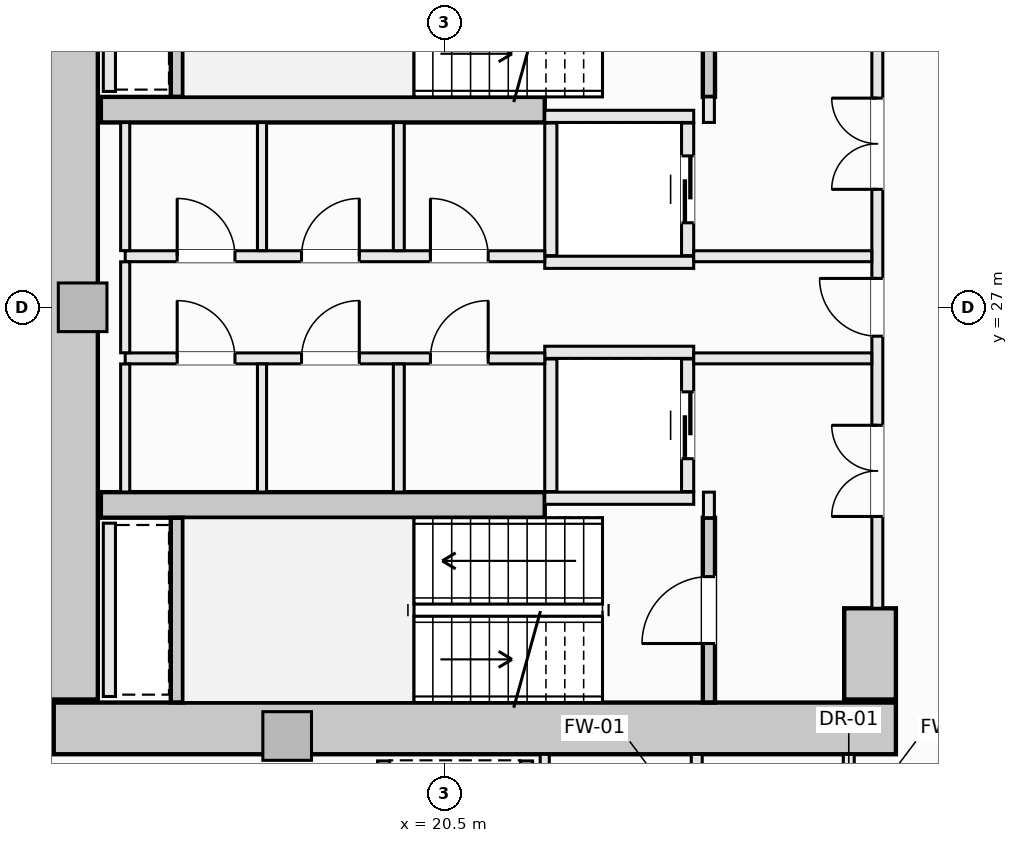
"""IFC4 building model, lengths in metres.
Left out: names, types, materials, properties, quantities, classifications, styles, units other than length and angle.
Written with IfcOpenShell. Run it as: python <this file> out.ifc"""

import sys

from ifc_helpers import new_model, si_unit, direction, frame, frame_2d, origin, origin_2d, place, context, subcontext, project, spatial, rectangle, extrude, element, fill, save


model = new_model("IFC4")
c1 = context("Model", 3, precision=1e-05, world=origin(), true_north=direction((0.0, 1.0)))
c2 = subcontext(c1, "Body", "Model", "MODEL_VIEW")
j1 = project(units=[si_unit("LENGTHUNIT", "METRE"), si_unit("PLANEANGLEUNIT", "RADIAN")], contexts=[c1])
p1 = place(None, origin())
s1 = spatial("IfcSite", under=j1, at=p1, CompositionType="ELEMENT")
p2 = place(p1, origin())
s2 = spatial("IfcBuilding", under=s1, at=p2, CompositionType="ELEMENT")
p3 = place(p2, frame((0.0, 0.0, 34.2)))
s3 = spatial("IfcBuildingStorey", under=s2, at=p3, CompositionType="ELEMENT", Elevation=34.2)
p4 = place(p3, frame((14.075, 20.075, -0.28), z_axis=(0.0, 0.0, 1.0), x_axis=(1.0, 0.0, 0.0)))
e1 = element("IfcWall", 1, at=p4, inside=s3, PredefinedType="SHEAR", context=c2, shape_type="SweptSolid", body=[
    extrude(rectangle(XDim=13.85, YDim=0.85, at=frame_2d((6.925, 0.0))), origin(), (0.0, 0.0, 1.0), 3.85),
])
p5 = place(p3, frame((14.375, 20.55, -0.28), z_axis=(0.0, 0.0, 1.0), x_axis=(0.0, 1.0, 0.0)))
e2 = element("IfcWall", 2, at=p5, inside=s3, PredefinedType="SHEAR", context=c2, shape_type="SweptSolid", body=[
    extrude(rectangle(XDim=12.9, YDim=0.85, at=frame_2d((6.45, 0.0))), origin(), (0.0, 0.0, 1.0), 3.85),
])
p6 = place(p3, frame((27.5, 20.55, -0.28), z_axis=(0.0, 0.0, 1.0), x_axis=(0.0, 1.0, 0.0)))
e3 = element("IfcWall", 3, at=p6, inside=s3, PredefinedType="SHEAR", context=c2, shape_type="SweptSolid", body=[
    extrude(rectangle(XDim=1.5, YDim=0.85, at=frame_2d((0.75, 0.0))), origin(), (0.0, 0.0, 1.0), 3.85),
])
for number, where, z_axis, x_axis in (
    (4, (14.85, 30.25, -0.28), (0.0, 0.0, 1.0), (1.0, 0.0, 0.0)),
    (5, (14.85, 23.75, -0.28), (0.0, 0.0, 1.0), (1.0, 0.0, 0.0)),
):
    element("IfcWall", number, at=place(p3, frame(where, z_axis=z_axis, x_axis=x_axis)), inside=s3, PredefinedType="SHEAR", context=c2, shape_type="SweptSolid", body=[
        extrude(rectangle(XDim=7.3, YDim=0.42, at=frame_2d((3.65, 0.0))), origin(), (0.0, 0.0, 1.0), 3.85),
    ])
for number, where, z_axis, x_axis in (
    (6, (14.55, 27.0, -0.28), (0.0, 0.0, 1.0), (1.0, 0.0, 0.0)),
    (7, (17.914, 19.95, -0.28), (0.0, 0.0, 1.0), (1.0, 0.0, 0.0)),
):
    element("IfcColumn", number, at=place(p3, frame(where, z_axis=z_axis, x_axis=x_axis)), inside=s3, PredefinedType="PILASTER", context=c2, shape_type="SweptSolid", body=[
        extrude(rectangle(XDim=0.8, YDim=0.8, at=origin_2d()), origin(), (0.0, 0.0, 1.0), 3.85),
    ])
p7 = place(p3, frame((24.85, 30.46, -0.28), z_axis=(0.0, 0.0, 1.0), x_axis=(0.0, 1.0, 0.0)))
e8 = element("IfcWall", 8, at=p7, inside=s3, PredefinedType="SHEAR", context=c2, shape_type="SweptSolid", body=[
    extrude(rectangle(XDim=3.038, YDim=0.2, at=frame_2d((1.519, 0.0))), origin(), (0.0, 0.0, 1.0), 3.85),
])
p8 = place(p7, frame((0.969, 0.0, 0.28)))
e9 = element("IfcOpeningElement", 9, at=p8, cuts=e8, PredefinedType="OPENING", context=c2, shape_type="SweptSolid", body=[
    extrude(rectangle(XDim=1.1, YDim=2.15, at=frame_2d((0.55, 1.075))), frame((0.0, 0.11, 0.0), z_axis=(0.0, -1.0, 0.0), x_axis=(1.0, 0.0, 0.0)), (0.0, 0.0, 1.0), 0.22),
])
p9 = place(p3, frame((16.1, 30.462, -0.28), z_axis=(0.0, 0.0, 1.0), x_axis=(0.0, 1.0, 0.0)))
e10 = element("IfcWall", 10, at=p9, inside=s3, PredefinedType="SHEAR", context=c2, shape_type="SweptSolid", body=[
    extrude(rectangle(XDim=3.036, YDim=0.2, at=frame_2d((1.518, 0.0))), origin(), (0.0, 0.0, 1.0), 3.85),
])
p10 = place(p3, frame((24.85, 20.502, -0.28), z_axis=(0.0, 0.0, 1.0), x_axis=(0.0, 1.0, 0.0)))
e11 = element("IfcWall", 11, at=p10, inside=s3, PredefinedType="SHEAR", context=c2, shape_type="SweptSolid", body=[
    extrude(rectangle(XDim=3.038, YDim=0.2, at=frame_2d((1.519, 0.0))), origin(), (0.0, 0.0, 1.0), 3.85),
])
p11 = place(p10, frame((0.969, 0.0, 0.28)))
e12 = element("IfcOpeningElement", 12, at=p11, cuts=e11, PredefinedType="OPENING", context=c2, shape_type="SweptSolid", body=[
    extrude(rectangle(XDim=1.1, YDim=2.15, at=frame_2d((0.55, 1.075))), frame((0.0, 0.11, 0.0), z_axis=(0.0, -1.0, 0.0), x_axis=(1.0, 0.0, 0.0)), (0.0, 0.0, 1.0), 0.22),
])
p12 = place(p3, frame((16.1, 20.502, -0.28), z_axis=(0.0, 0.0, 1.0), x_axis=(0.0, 1.0, 0.0)))
e13 = element("IfcWall", 13, at=p12, inside=s3, PredefinedType="SHEAR", context=c2, shape_type="SweptSolid", body=[
    extrude(rectangle(XDim=3.036, YDim=0.2, at=frame_2d((1.518, 0.0))), origin(), (0.0, 0.0, 1.0), 3.85),
])
for number, where, z_axis, x_axis in (
    (14, (22.15, 30.14, 0.0), (0.0, 0.0, 1.0), (1.0, 0.0, 0.0)),
    (15, (22.15, 27.74, 0.0), (0.0, 0.0, 1.0), (1.0, 0.0, 0.0)),
):
    element("IfcWall", number, at=place(p3, frame(where, z_axis=z_axis, x_axis=x_axis)), inside=s3, PredefinedType="SOLIDWALL", context=c2, shape_type="SweptSolid", body=[
        extrude(rectangle(XDim=2.45, YDim=0.2, at=frame_2d((1.225, 0.0))), origin(), (0.0, 0.0, 1.0), 3.57),
    ])
p13 = place(p3, frame((22.25, 27.85, 0.0), z_axis=(0.0, 0.0, 1.0), x_axis=(0.0, 1.0, 0.0)))
e16 = element("IfcWall", 16, at=p13, inside=s3, PredefinedType="SOLIDWALL", context=c2, shape_type="SweptSolid", body=[
    extrude(rectangle(XDim=2.18, YDim=0.2, at=frame_2d((1.09, 0.0))), origin(), (0.0, 0.0, 1.0), 3.57),
])
p14 = place(p3, frame((24.5, 27.85, 0.0), z_axis=(0.0, 0.0, 1.0), x_axis=(0.0, 1.0, 0.0)))
e17 = element("IfcWall", 17, at=p14, inside=s3, PredefinedType="SOLIDWALL", context=c2, shape_type="SweptSolid", body=[
    extrude(rectangle(XDim=2.18, YDim=0.2, at=frame_2d((1.09, 0.0))), origin(), (0.0, 0.0, 1.0), 3.57),
])
p15 = place(p14, frame((0.54, 0.0, 0.0)))
e18 = element("IfcOpeningElement", 18, at=p15, cuts=e17, PredefinedType="OPENING", context=c2, shape_type="SweptSolid", body=[
    extrude(rectangle(XDim=1.1, YDim=2.2, at=frame_2d((0.55, 1.1))), frame((0.0, 0.11, 0.0), z_axis=(0.0, -1.0, 0.0), x_axis=(1.0, 0.0, 0.0)), (0.0, 0.0, 1.0), 0.22),
])
for number, where, z_axis, x_axis in (
    (19, (22.15, 26.26, 0.0), (0.0, 0.0, 1.0), (1.0, 0.0, 0.0)),
    (20, (22.15, 23.86, 0.0), (0.0, 0.0, 1.0), (1.0, 0.0, 0.0)),
):
    element("IfcWall", number, at=place(p3, frame(where, z_axis=z_axis, x_axis=x_axis)), inside=s3, PredefinedType="SOLIDWALL", context=c2, shape_type="SweptSolid", body=[
        extrude(rectangle(XDim=2.45, YDim=0.2, at=frame_2d((1.225, 0.0))), origin(), (0.0, 0.0, 1.0), 3.57),
    ])
p16 = place(p3, frame((22.25, 23.97, 0.0), z_axis=(0.0, 0.0, 1.0), x_axis=(0.0, 1.0, 0.0)))
e21 = element("IfcWall", 21, at=p16, inside=s3, PredefinedType="SOLIDWALL", context=c2, shape_type="SweptSolid", body=[
    extrude(rectangle(XDim=2.18, YDim=0.2, at=frame_2d((1.09, 0.0))), origin(), (0.0, 0.0, 1.0), 3.57),
])
p17 = place(p3, frame((24.5, 23.97, 0.0), z_axis=(0.0, 0.0, 1.0), x_axis=(0.0, 1.0, 0.0)))
e22 = element("IfcWall", 22, at=p17, inside=s3, PredefinedType="SOLIDWALL", context=c2, shape_type="SweptSolid", body=[
    extrude(rectangle(XDim=2.18, YDim=0.2, at=frame_2d((1.09, 0.0))), origin(), (0.0, 0.0, 1.0), 3.57),
])
p18 = place(p17, frame((0.54, 0.0, 0.0)))
e23 = element("IfcOpeningElement", 23, at=p18, cuts=e22, PredefinedType="OPENING", context=c2, shape_type="SweptSolid", body=[
    extrude(rectangle(XDim=1.1, YDim=2.2, at=frame_2d((0.55, 1.1))), frame((0.0, 0.11, 0.0), z_axis=(0.0, -1.0, 0.0), x_axis=(1.0, 0.0, 0.0)), (0.0, 0.0, 1.0), 0.22),
])
for number, where, z_axis, x_axis in (
    (24, (19.5, 17.01, 0.0), (0.0, 0.0, 1.0), (0.0, 1.0, 0.0)),
    (25, (21.85, 17.01, 0.0), (0.0, 0.0, 1.0), (0.0, 1.0, 0.0)),
):
    element("IfcWall", number, at=place(p3, frame(where, z_axis=z_axis, x_axis=x_axis)), inside=s3, PredefinedType="SOLIDWALL", context=c2, shape_type="SweptSolid", body=[
        extrude(rectangle(XDim=2.53, YDim=0.2, at=frame_2d((1.265, 0.0))), origin(), (0.0, 0.0, 1.0), 3.57),
    ])
for number, where, z_axis, x_axis in (
    (26, (14.99, 30.55, 0.0), (0.0, 0.0, 1.0), (0.0, 1.0, 0.0)),
    (27, (14.99, 20.6, 0.0), (0.0, 0.0, 1.0), (0.0, 1.0, 0.0)),
):
    element("IfcWall", number, at=place(p3, frame(where, z_axis=z_axis, x_axis=x_axis)), inside=s3, PredefinedType="SOLIDWALL", context=c2, shape_type="SweptSolid", body=[
        extrude(rectangle(XDim=2.85, YDim=0.2, at=frame_2d((1.425, 0.0))), origin(), (0.0, 0.0, 1.0), 3.57),
    ])
for number, where, z_axis, x_axis in (
    (28, (24.85, 23.54, 0.0), (0.0, 0.0, 1.0), (0.0, 1.0, 0.0)),
    (29, (24.85, 30.04, 0.0), (0.0, 0.0, 1.0), (0.0, 1.0, 0.0)),
):
    element("IfcWall", number, at=place(p3, frame(where, z_axis=z_axis, x_axis=x_axis)), inside=s3, PredefinedType="SOLIDWALL", context=c2, shape_type="SweptSolid", body=[
        extrude(rectangle(XDim=0.42, YDim=0.18, at=frame_2d((0.21, 0.0))), origin(), (0.0, 0.0, 1.0), 3.57),
    ])
p19 = place(p3, frame((27.62, 22.05, 0.0), z_axis=(0.0, 0.0, 1.0), x_axis=(0.0, 1.0, 0.0)))
e30 = element("IfcWall", 30, at=p19, inside=s3, PredefinedType="SOLIDWALL", context=c2, shape_type="SweptSolid", body=[
    extrude(rectangle(XDim=9.9, YDim=0.18, at=frame_2d((4.95, 0.0))), origin(), (0.0, 0.0, 1.0), 2.662),
])
p20 = place(p19, frame((4.475, 0.0, 0.0)))
e31 = element("IfcOpeningElement", 31, at=p20, cuts=e30, PredefinedType="OPENING", context=c2, shape_type="SweptSolid", body=[
    extrude(rectangle(XDim=0.95, YDim=2.1, at=frame_2d((0.475, 1.05))), frame((0.0, 0.1, 0.0), z_axis=(0.0, -1.0, 0.0), x_axis=(1.0, 0.0, 0.0)), (0.0, 0.0, 1.0), 0.2),
])
p21 = place(p19, frame((6.89, 0.0, 0.0)))
e32 = element("IfcOpeningElement", 32, at=p21, cuts=e30, PredefinedType="OPENING", context=c2, shape_type="SweptSolid", body=[
    extrude(rectangle(XDim=1.5, YDim=2.2, at=frame_2d((0.75, 1.1))), frame((0.0, 0.1, 0.0), z_axis=(0.0, -1.0, 0.0), x_axis=(1.0, 0.0, 0.0)), (0.0, 0.0, 1.0), 0.2),
])
p22 = place(p19, frame((1.51, 0.0, 0.0)))
e33 = element("IfcOpeningElement", 33, at=p22, cuts=e30, PredefinedType="OPENING", context=c2, shape_type="SweptSolid", body=[
    extrude(rectangle(XDim=1.5, YDim=2.2, at=frame_2d((0.75, 1.1))), frame((0.0, 0.1, 0.0), z_axis=(0.0, -1.0, 0.0), x_axis=(1.0, 0.0, 0.0)), (0.0, 0.0, 1.0), 0.2),
])
p23 = place(p3, frame((15.25, 27.84, 0.0), z_axis=(0.0, 0.0, 1.0), x_axis=(1.0, 0.0, 0.0)))
e34 = element("IfcWall", 34, at=p23, inside=s3, PredefinedType="SOLIDWALL", context=c2, shape_type="SweptSolid", body=[
    extrude(rectangle(XDim=6.9, YDim=0.18, at=frame_2d((3.45, 0.0))), origin(), (0.0, 0.0, 1.0), 3.57),
])
p24 = place(p23, frame((5.02, 0.0, 0.0)))
e35 = element("IfcOpeningElement", 35, at=p24, cuts=e34, PredefinedType="OPENING", context=c2, shape_type="SweptSolid", body=[
    extrude(rectangle(XDim=0.95, YDim=2.1, at=frame_2d((0.475, 1.05))), frame((0.0, 0.1, 0.0), z_axis=(0.0, -1.0, 0.0), x_axis=(1.0, 0.0, 0.0)), (0.0, 0.0, 1.0), 0.2),
])
p25 = place(p23, frame((0.855, 0.0, 0.0)))
e36 = element("IfcOpeningElement", 36, at=p25, cuts=e34, PredefinedType="OPENING", context=c2, shape_type="SweptSolid", body=[
    extrude(rectangle(XDim=0.95, YDim=2.1, at=frame_2d((0.475, 1.05))), frame((0.0, 0.1, 0.0), z_axis=(0.0, -1.0, 0.0), x_axis=(1.0, 0.0, 0.0)), (0.0, 0.0, 1.0), 0.2),
])
p26 = place(p23, frame((2.9, 0.0, 0.0)))
e37 = element("IfcOpeningElement", 37, at=p26, cuts=e34, PredefinedType="OPENING", context=c2, shape_type="SweptSolid", body=[
    extrude(rectangle(XDim=0.95, YDim=2.1, at=frame_2d((0.475, 1.05))), frame((0.0, 0.1, 0.0), z_axis=(0.0, -1.0, 0.0), x_axis=(1.0, 0.0, 0.0)), (0.0, 0.0, 1.0), 0.2),
])
p27 = place(p3, frame((24.6, 27.84, 0.0), z_axis=(0.0, 0.0, 1.0), x_axis=(1.0, 0.0, 0.0)))
e38 = element("IfcWall", 38, at=p27, inside=s3, PredefinedType="SOLIDWALL", context=c2, shape_type="SweptSolid", body=[
    extrude(rectangle(XDim=2.928, YDim=0.18, at=frame_2d((1.464, 0.0))), origin(), (0.0, 0.0, 1.0), 3.57),
])
p28 = place(p3, frame((15.25, 26.16, 0.0), z_axis=(0.0, 0.0, 1.0), x_axis=(1.0, 0.0, 0.0)))
e39 = element("IfcWall", 39, at=p28, inside=s3, PredefinedType="SOLIDWALL", context=c2, shape_type="SweptSolid", body=[
    extrude(rectangle(XDim=6.9, YDim=0.18, at=frame_2d((3.45, 0.0))), origin(), (0.0, 0.0, 1.0), 3.57),
])
p29 = place(p28, frame((5.02, 0.0, 0.0)))
e40 = element("IfcOpeningElement", 40, at=p29, cuts=e39, PredefinedType="OPENING", context=c2, shape_type="SweptSolid", body=[
    extrude(rectangle(XDim=0.95, YDim=2.1, at=frame_2d((0.475, 1.05))), frame((0.0, 0.1, 0.0), z_axis=(0.0, -1.0, 0.0), x_axis=(1.0, 0.0, 0.0)), (0.0, 0.0, 1.0), 0.2),
])
p30 = place(p28, frame((0.855, 0.0, 0.0)))
e41 = element("IfcOpeningElement", 41, at=p30, cuts=e39, PredefinedType="OPENING", context=c2, shape_type="SweptSolid", body=[
    extrude(rectangle(XDim=0.95, YDim=2.1, at=frame_2d((0.475, 1.05))), frame((0.0, 0.1, 0.0), z_axis=(0.0, -1.0, 0.0), x_axis=(1.0, 0.0, 0.0)), (0.0, 0.0, 1.0), 0.2),
])
p31 = place(p28, frame((2.9, 0.0, 0.0)))
e42 = element("IfcOpeningElement", 42, at=p31, cuts=e39, PredefinedType="OPENING", context=c2, shape_type="SweptSolid", body=[
    extrude(rectangle(XDim=0.95, YDim=2.1, at=frame_2d((0.475, 1.05))), frame((0.0, 0.1, 0.0), z_axis=(0.0, -1.0, 0.0), x_axis=(1.0, 0.0, 0.0)), (0.0, 0.0, 1.0), 0.2),
])
p32 = place(p3, frame((24.6, 26.16, 0.0), z_axis=(0.0, 0.0, 1.0), x_axis=(1.0, 0.0, 0.0)))
e43 = element("IfcWall", 43, at=p32, inside=s3, PredefinedType="SOLIDWALL", context=c2, shape_type="SweptSolid", body=[
    extrude(rectangle(XDim=2.928, YDim=0.18, at=frame_2d((1.464, 0.0))), origin(), (0.0, 0.0, 1.0), 3.57),
])
p33 = place(p3, frame((15.25, 23.962, 0.0), z_axis=(0.0, 0.0, 1.0), x_axis=(0.0, 1.0, 0.0)))
e44 = element("IfcWall", 44, at=p33, inside=s3, PredefinedType="PARTITIONING", context=c2, shape_type="SweptSolid", body=[
    extrude(rectangle(XDim=2.106, YDim=0.15, at=frame_2d((1.053, 0.0))), origin(), (0.0, 0.0, 1.0), 3.57),
])
p34 = place(p3, frame((15.25, 26.252, 0.0), z_axis=(0.0, 0.0, 1.0), x_axis=(0.0, 1.0, 0.0)))
e45 = element("IfcWall", 45, at=p34, inside=s3, PredefinedType="PARTITIONING", context=c2, shape_type="SweptSolid", body=[
    extrude(rectangle(XDim=1.496, YDim=0.15, at=frame_2d((0.748, 0.0))), origin(), (0.0, 0.0, 1.0), 3.57),
])
p35 = place(p3, frame((15.25, 27.932, 0.0), z_axis=(0.0, 0.0, 1.0), x_axis=(0.0, 1.0, 0.0)))
e46 = element("IfcWall", 46, at=p35, inside=s3, PredefinedType="PARTITIONING", context=c2, shape_type="SweptSolid", body=[
    extrude(rectangle(XDim=2.106, YDim=0.15, at=frame_2d((1.053, 0.0))), origin(), (0.0, 0.0, 1.0), 3.57),
])
for number, where, z_axis, x_axis in (
    (47, (19.75, 23.962, 0.0), (0.0, 0.0, 1.0), (0.0, 1.0, 0.0)),
    (48, (19.75, 27.932, 0.0), (0.0, 0.0, 1.0), (0.0, 1.0, 0.0)),
):
    element("IfcWall", number, at=place(p3, frame(where, z_axis=z_axis, x_axis=x_axis)), inside=s3, PredefinedType="SOLIDWALL", context=c2, shape_type="SweptSolid", body=[
        extrude(rectangle(XDim=2.106, YDim=0.18, at=frame_2d((1.053, 0.0))), origin(), (0.0, 0.0, 1.0), 3.57),
    ])
for number, where, z_axis, x_axis in (
    (49, (17.5, 23.962, 0.0), (0.0, 0.0, 1.0), (0.0, 1.0, 0.0)),
    (50, (17.5, 27.932, 0.0), (0.0, 0.0, 1.0), (0.0, 1.0, 0.0)),
):
    element("IfcWall", number, at=place(p3, frame(where, z_axis=z_axis, x_axis=x_axis)), inside=s3, PredefinedType="PARTITIONING", context=c2, shape_type="SweptSolid", body=[
        extrude(rectangle(XDim=2.106, YDim=0.15, at=frame_2d((1.053, 0.0))), origin(), (0.0, 0.0, 1.0), 3.57),
    ])
p36 = place(p3, frame((22.15, 17.142, 0.0), z_axis=(0.0, 0.0, 1.0), x_axis=(0.0, 1.0, 0.0)))
e51 = element("IfcWall", 51, at=p36, inside=s3, PredefinedType="PARTITIONING", context=c2, shape_type="SweptSolid", body=[
    extrude(rectangle(XDim=2.506, YDim=0.15, at=frame_2d((1.253, 0.0))), origin(), (0.0, 0.0, 1.0), 3.57),
])
p37 = place(p3, frame((24.65, 17.142, 0.0), z_axis=(0.0, 0.0, 1.0), x_axis=(0.0, 1.0, 0.0)))
e52 = element("IfcWall", 52, at=p37, inside=s3, PredefinedType="SOLIDWALL", context=c2, shape_type="SweptSolid", body=[
    extrude(rectangle(XDim=2.506, YDim=0.18, at=frame_2d((1.253, 0.0))), origin(), (0.0, 0.0, 1.0), 3.57),
])
p38 = place(p37, frame((0.778, 0.0, 0.0)))
e53 = element("IfcOpeningElement", 53, at=p38, cuts=e52, PredefinedType="OPENING", context=c2, shape_type="SweptSolid", body=[
    extrude(rectangle(XDim=0.95, YDim=2.1, at=frame_2d((0.475, 1.05))), frame((0.0, 0.1, 0.0), z_axis=(0.0, -1.0, 0.0), x_axis=(1.0, 0.0, 0.0)), (0.0, 0.0, 1.0), 0.2),
])
p39 = place(p3, frame((27.15, 17.142, 0.0), z_axis=(0.0, 0.0, 1.0), x_axis=(0.0, 1.0, 0.0)))
e54 = element("IfcWall", 54, at=p39, inside=s3, PredefinedType="SOLIDWALL", context=c2, shape_type="SweptSolid", body=[
    extrude(rectangle(XDim=2.506, YDim=0.18, at=frame_2d((1.253, 0.0))), origin(), (0.0, 0.0, 1.0), 3.57),
])
p40 = place(p39, frame((0.778, 0.0, 0.0)))
e55 = element("IfcOpeningElement", 55, at=p40, cuts=e54, PredefinedType="OPENING", context=c2, shape_type="SweptSolid", body=[
    extrude(rectangle(XDim=0.95, YDim=2.1, at=frame_2d((0.475, 1.05))), frame((0.0, 0.1, 0.0), z_axis=(0.0, -1.0, 0.0), x_axis=(1.0, 0.0, 0.0)), (0.0, 0.0, 1.0), 0.2),
])
p41 = place(p3, frame((3.094, 21.29, 0.0), z_axis=(0.0, 0.0, 1.0), x_axis=(0.936344026666, -0.35108384145, 0.0)))
e56 = element("IfcWall", 56, at=p41, inside=s3, PredefinedType="PARTITIONING", context=c2, shape_type="SweptSolid", body=[
    extrude(rectangle(XDim=21.62, YDim=0.12, at=frame_2d((10.81, 0.0))), origin(), (0.0, 0.0, 1.0), 3.57),
])
p42 = place(p11, origin())
e57 = element("IfcDoor", 57, at=p42, inside=s3, OperationType="SINGLE_SWING_LEFT", PredefinedType="DOOR", context=c2, shape_type="SweptSolid", body=[
    extrude(rectangle(XDim=1.1, YDim=2.15, at=frame_2d((0.55, 1.075))), frame((0.0, 0.025, 0.0), z_axis=(0.0, -1.0, 0.0), x_axis=(1.0, 0.0, 0.0)), (0.0, 0.0, 1.0), 0.05),
])
fill(e12, e57)
p43 = place(p15, origin())
e58 = element("IfcDoor", 58, at=p43, inside=s3, OperationType="SLIDING_TO_LEFT", PredefinedType="DOOR", context=c2, shape_type="SweptSolid", body=[
    extrude(rectangle(XDim=1.1, YDim=2.2, at=frame_2d((0.55, 1.1))), frame((0.0, 0.025, 0.0), z_axis=(0.0, -1.0, 0.0), x_axis=(1.0, 0.0, 0.0)), (0.0, 0.0, 1.0), 0.05),
])
fill(e18, e58)
p44 = place(p18, origin())
e59 = element("IfcDoor", 59, at=p44, inside=s3, OperationType="SLIDING_TO_LEFT", PredefinedType="DOOR", context=c2, shape_type="SweptSolid", body=[
    extrude(rectangle(XDim=1.1, YDim=2.2, at=frame_2d((0.55, 1.1))), frame((0.0, 0.025, 0.0), z_axis=(0.0, -1.0, 0.0), x_axis=(1.0, 0.0, 0.0)), (0.0, 0.0, 1.0), 0.05),
])
fill(e23, e59)
p45 = place(p20, origin())
e60 = element("IfcDoor", 60, at=p45, inside=s3, OperationType="SINGLE_SWING_RIGHT", PredefinedType="DOOR", context=c2, shape_type="SweptSolid", body=[
    extrude(rectangle(XDim=0.95, YDim=2.1, at=frame_2d((0.475, 1.05))), frame((0.0, 0.025, 0.0), z_axis=(0.0, -1.0, 0.0), x_axis=(1.0, 0.0, 0.0)), (0.0, 0.0, 1.0), 0.05),
])
fill(e31, e60)
p46 = place(p21, origin())
e61 = element("IfcDoor", 61, at=p46, inside=s3, OperationType="DOUBLE_DOOR_SINGLE_SWING", PredefinedType="DOOR", context=c2, shape_type="SweptSolid", body=[
    extrude(rectangle(XDim=1.5, YDim=2.2, at=frame_2d((0.75, 1.1))), frame((0.0, 0.025, 0.0), z_axis=(0.0, -1.0, 0.0), x_axis=(1.0, 0.0, 0.0)), (0.0, 0.0, 1.0), 0.05),
])
fill(e32, e61)
p47 = place(p22, origin())
e62 = element("IfcDoor", 62, at=p47, inside=s3, OperationType="DOUBLE_DOOR_SINGLE_SWING", PredefinedType="DOOR", context=c2, shape_type="SweptSolid", body=[
    extrude(rectangle(XDim=1.5, YDim=2.2, at=frame_2d((0.75, 1.1))), frame((0.0, 0.025, 0.0), z_axis=(0.0, -1.0, 0.0), x_axis=(1.0, 0.0, 0.0)), (0.0, 0.0, 1.0), 0.05),
])
fill(e33, e62)
p48 = place(p24, origin())
e63 = element("IfcDoor", 63, at=p48, inside=s3, OperationType="SINGLE_SWING_LEFT", PredefinedType="DOOR", context=c2, shape_type="SweptSolid", body=[
    extrude(rectangle(XDim=0.95, YDim=2.1, at=frame_2d((0.475, 1.05))), frame((0.0, 0.025, 0.0), z_axis=(0.0, -1.0, 0.0), x_axis=(1.0, 0.0, 0.0)), (0.0, 0.0, 1.0), 0.05),
])
fill(e35, e63)
p49 = place(p29, origin())
e64 = element("IfcDoor", 64, at=p49, inside=s3, OperationType="SINGLE_SWING_RIGHT", PredefinedType="DOOR", context=c2, shape_type="SweptSolid", body=[
    extrude(rectangle(XDim=0.95, YDim=2.1, at=frame_2d((0.475, 1.05))), frame((0.0, 0.025, 0.0), z_axis=(0.0, -1.0, 0.0), x_axis=(1.0, 0.0, 0.0)), (0.0, 0.0, 1.0), 0.05),
])
fill(e40, e64)
p50 = place(p25, origin())
e65 = element("IfcDoor", 65, at=p50, inside=s3, OperationType="SINGLE_SWING_LEFT", PredefinedType="DOOR", context=c2, shape_type="SweptSolid", body=[
    extrude(rectangle(XDim=0.95, YDim=2.1, at=frame_2d((0.475, 1.05))), frame((0.0, 0.025, 0.0), z_axis=(0.0, -1.0, 0.0), x_axis=(1.0, 0.0, 0.0)), (0.0, 0.0, 1.0), 0.05),
])
fill(e36, e65)
p51 = place(p26, origin())
e66 = element("IfcDoor", 66, at=p51, inside=s3, OperationType="SINGLE_SWING_RIGHT", PredefinedType="DOOR", context=c2, shape_type="SweptSolid", body=[
    extrude(rectangle(XDim=0.95, YDim=2.1, at=frame_2d((0.475, 1.05))), frame((0.0, 0.025, 0.0), z_axis=(0.0, -1.0, 0.0), x_axis=(1.0, 0.0, 0.0)), (0.0, 0.0, 1.0), 0.05),
])
fill(e37, e66)
p52 = place(p30, origin())
e67 = element("IfcDoor", 67, at=p52, inside=s3, OperationType="SINGLE_SWING_LEFT", PredefinedType="DOOR", context=c2, shape_type="SweptSolid", body=[
    extrude(rectangle(XDim=0.95, YDim=2.1, at=frame_2d((0.475, 1.05))), frame((0.0, 0.025, 0.0), z_axis=(0.0, -1.0, 0.0), x_axis=(1.0, 0.0, 0.0)), (0.0, 0.0, 1.0), 0.05),
])
fill(e41, e67)
p53 = place(p31, origin())
e68 = element("IfcDoor", 68, at=p53, inside=s3, OperationType="SINGLE_SWING_RIGHT", PredefinedType="DOOR", context=c2, shape_type="SweptSolid", body=[
    extrude(rectangle(XDim=0.95, YDim=2.1, at=frame_2d((0.475, 1.05))), frame((0.0, 0.025, 0.0), z_axis=(0.0, -1.0, 0.0), x_axis=(1.0, 0.0, 0.0)), (0.0, 0.0, 1.0), 0.05),
])
fill(e42, e68)
save(model, sys.argv[1])
